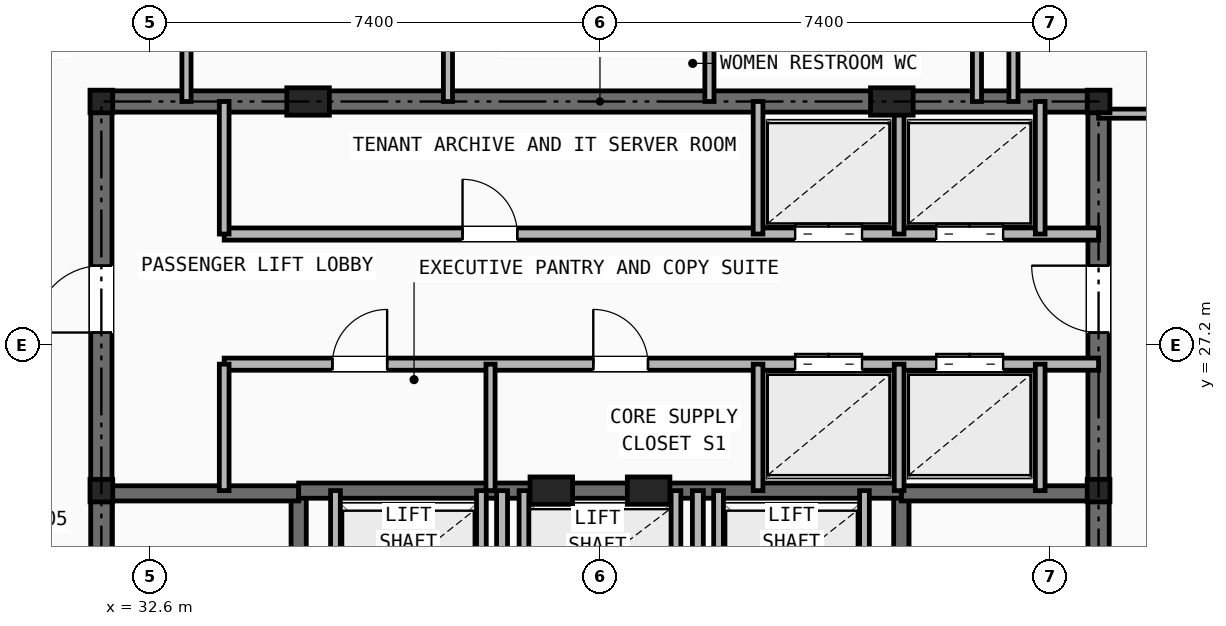
"""IFC4 building model, lengths in metres.
Left out: names, types, materials, properties, quantities, classifications, styles, units other than length and angle.
Written with IfcOpenShell. Run it as: python <this file> out.ifc"""

import sys

from ifc_helpers import new_model, si_unit, direction, frame, frame_2d, origin, origin_2d, place, context, subcontext, project, spatial, rectangle, i_section, extrude, element, fill, save


model = new_model("IFC4")
c1 = context("Model", 3, precision=1e-05, world=origin(), true_north=direction((0.0, 1.0)))
c2 = subcontext(c1, "Body", "Model", "MODEL_VIEW")
j1 = project(units=[si_unit("LENGTHUNIT", "METRE"), si_unit("PLANEANGLEUNIT", "RADIAN")], contexts=[c1])
p1 = place(None, origin())
s1 = spatial("IfcSite", under=j1, at=p1, CompositionType="ELEMENT")
p2 = place(p1, origin())
s2 = spatial("IfcBuilding", under=s1, at=p2, CompositionType="ELEMENT")
p3 = place(p2, frame((0.0, 0.0, 265.5)))
s3 = spatial("IfcBuildingStorey", under=s2, at=p3, CompositionType="ELEMENT", Elevation=265.5)
for number, where, z_axis, x_axis in (
    (1, (31.8, 24.8, 0.0), (0.0, 0.0, 1.0), (1.0, 0.0, 0.0)),
    (2, (48.2, 24.8, 0.0), (0.0, 0.0, 1.0), (1.0, 0.0, 0.0)),
    (3, (31.8, 31.2, 0.0), (0.0, 0.0, 1.0), (1.0, 0.0, 0.0)),
    (4, (48.2, 31.2, 0.0), (0.0, 0.0, 1.0), (1.0, 0.0, 0.0)),
):
    element("IfcColumn", number, at=place(p3, frame(where, z_axis=z_axis, x_axis=x_axis)), inside=s3, PredefinedType="COLUMN", context=c2, shape_type="SweptSolid", body=[
        extrude(i_section(OverallWidth=0.374, OverallDepth=0.372, WebThickness=0.016, FlangeThickness=0.026, at=origin_2d()), origin(), (0.0, 0.0, 1.0), 3.5),
    ])
for number, where, z_axis, x_axis in (
    (5, (35.2, 31.2, 0.0), (0.0, 0.0, 1.0), (1.0, 0.0, 0.0)),
    (6, (44.8, 31.2, 0.0), (0.0, 0.0, 1.0), (1.0, 0.0, 0.0)),
    (7, (39.2, 24.8, 0.0), (0.0, 0.0, 1.0), (1.0, 0.0, 0.0)),
    (8, (40.8, 24.8, 0.0), (0.0, 0.0, 1.0), (1.0, 0.0, 0.0)),
):
    element("IfcColumn", number, at=place(p3, frame(where, z_axis=z_axis, x_axis=x_axis)), inside=s3, PredefinedType="PILASTER", context=c2, shape_type="SweptSolid", body=[
        extrude(rectangle(XDim=0.7, YDim=0.45, at=origin_2d()), origin(), (0.0, 0.0, 1.0), 3.5),
    ])
p4 = place(p3, frame((31.8, 31.2, 0.0), z_axis=(0.0, 0.0, 1.0), x_axis=(1.0, 0.0, 0.0)))
e9 = element("IfcWall", 9, at=p4, inside=s3, PredefinedType="SHEAR", context=c2, shape_type="SweptSolid", body=[
    extrude(rectangle(XDim=16.4, YDim=0.35, at=frame_2d((8.2, 0.0))), origin(), (0.0, 0.0, 1.0), 3.25),
])
p5 = place(p3, frame((31.8, 16.4, 0.0), z_axis=(0.0, 0.0, 1.0), x_axis=(0.0, 1.0, 0.0)))
e10 = element("IfcWall", 10, at=p5, inside=s3, PredefinedType="SHEAR", context=c2, shape_type="SweptSolid", body=[
    extrude(rectangle(XDim=14.8, YDim=0.35, at=frame_2d((7.4, 0.0))), origin(), (0.0, 0.0, 1.0), 3.25),
])
p6 = place(p5, frame((11.0, 0.0, 0.0)))
e11 = element("IfcOpeningElement", 11, at=p6, cuts=e10, PredefinedType="OPENING", context=c2, shape_type="SweptSolid", body=[
    extrude(rectangle(XDim=1.1, YDim=2.15, at=frame_2d((0.55, 1.075))), frame((0.0, 0.185, 0.0), z_axis=(0.0, -1.0, 0.0), x_axis=(1.0, 0.0, 0.0)), (0.0, 0.0, 1.0), 0.37),
])
p7 = place(p3, frame((48.2, 16.4, 0.0), z_axis=(0.0, 0.0, 1.0), x_axis=(0.0, 1.0, 0.0)))
e12 = element("IfcWall", 12, at=p7, inside=s3, PredefinedType="SHEAR", context=c2, shape_type="SweptSolid", body=[
    extrude(rectangle(XDim=14.8, YDim=0.35, at=frame_2d((7.4, 0.0))), origin(), (0.0, 0.0, 1.0), 3.25),
])
p8 = place(p7, frame((11.0, 0.0, 0.0)))
e13 = element("IfcOpeningElement", 13, at=p8, cuts=e12, PredefinedType="OPENING", context=c2, shape_type="SweptSolid", body=[
    extrude(rectangle(XDim=1.1, YDim=2.15, at=frame_2d((0.55, 1.075))), frame((0.0, 0.185, 0.0), z_axis=(0.0, -1.0, 0.0), x_axis=(1.0, 0.0, 0.0)), (0.0, 0.0, 1.0), 0.37),
])
p9 = place(p3, frame((35.045, 16.4, 0.0), z_axis=(0.0, 0.0, 1.0), x_axis=(0.0, 1.0, 0.0)))
e14 = element("IfcWall", 14, at=p9, inside=s3, PredefinedType="SHEAR", context=c2, shape_type="SweptSolid", body=[
    extrude(rectangle(XDim=8.4, YDim=0.25, at=frame_2d((4.2, 0.0))), origin(), (0.0, 0.0, 1.0), 3.25),
])
p10 = place(p9, frame((0.45, 0.0, 0.0)))
e15 = element("IfcOpeningElement", 15, at=p10, cuts=e14, PredefinedType="OPENING", context=c2, shape_type="SweptSolid", body=[
    extrude(rectangle(XDim=0.95, YDim=2.1, at=frame_2d((0.475, 1.05))), frame((0.0, 0.135, 0.0), z_axis=(0.0, -1.0, 0.0), x_axis=(1.0, 0.0, 0.0)), (0.0, 0.0, 1.0), 0.27),
])
p11 = place(p3, frame((31.8, 24.755, 0.0), z_axis=(0.0, 0.0, 1.0), x_axis=(1.0, 0.0, 0.0)))
e16 = element("IfcWall", 16, at=p11, inside=s3, PredefinedType="SHEAR", context=c2, shape_type="SweptSolid", body=[
    extrude(rectangle(XDim=3.245, YDim=0.25, at=frame_2d((1.623, 0.0))), origin(), (0.0, 0.0, 1.0), 3.25),
])
p12 = place(p3, frame((44.955, 16.4, 0.0), z_axis=(0.0, 0.0, 1.0), x_axis=(0.0, 1.0, 0.0)))
e17 = element("IfcWall", 17, at=p12, inside=s3, PredefinedType="SHEAR", context=c2, shape_type="SweptSolid", body=[
    extrude(rectangle(XDim=8.4, YDim=0.25, at=frame_2d((4.2, 0.0))), origin(), (0.0, 0.0, 1.0), 3.25),
])
p13 = place(p12, frame((0.45, 0.0, 0.0)))
e18 = element("IfcOpeningElement", 18, at=p13, cuts=e17, PredefinedType="OPENING", context=c2, shape_type="SweptSolid", body=[
    extrude(rectangle(XDim=0.95, YDim=2.1, at=frame_2d((0.475, 1.05))), frame((0.0, 0.135, 0.0), z_axis=(0.0, -1.0, 0.0), x_axis=(1.0, 0.0, 0.0)), (0.0, 0.0, 1.0), 0.27),
])
p14 = place(p3, frame((44.955, 24.755, 0.0), z_axis=(0.0, 0.0, 1.0), x_axis=(1.0, 0.0, 0.0)))
e19 = element("IfcWall", 19, at=p14, inside=s3, PredefinedType="SHEAR", context=c2, shape_type="SweptSolid", body=[
    extrude(rectangle(XDim=3.245, YDim=0.25, at=frame_2d((1.623, 0.0))), origin(), (0.0, 0.0, 1.0), 3.25),
])
p15 = place(p3, frame((35.045, 24.8, 0.0), z_axis=(0.0, 0.0, 1.0), x_axis=(1.0, 0.0, 0.0)))
e20 = element("IfcWall", 20, at=p15, inside=s3, PredefinedType="SHEAR", context=c2, shape_type="SweptSolid", body=[
    extrude(rectangle(XDim=9.91, YDim=0.25, at=frame_2d((4.955, 0.0))), origin(), (0.0, 0.0, 1.0), 3.25),
])
p16 = place(p3, frame((38.39, 16.4, 0.0), z_axis=(0.0, 0.0, 1.0), x_axis=(0.0, 1.0, 0.0)))
e21 = element("IfcWall", 21, at=p16, inside=s3, PredefinedType="PARTITIONING", context=c2, shape_type="SweptSolid", body=[
    extrude(rectangle(XDim=8.4, YDim=0.18, at=frame_2d((4.2, 0.0))), origin(), (0.0, 0.0, 1.0), 2.978),
])
p17 = place(p16, frame((1.8, 0.0, 0.0)))
e22 = element("IfcOpeningElement", 22, at=p17, cuts=e21, PredefinedType="OPENING", context=c2, shape_type="SweptSolid", body=[
    extrude(rectangle(XDim=0.85, YDim=2.05, at=frame_2d((0.425, 1.025))), frame((0.0, 0.1, 0.0), z_axis=(0.0, -1.0, 0.0), x_axis=(1.0, 0.0, 0.0)), (0.0, 0.0, 1.0), 0.2),
])
p18 = place(p16, frame((4.35, 0.0, 0.0)))
e23 = element("IfcOpeningElement", 23, at=p18, cuts=e21, PredefinedType="OPENING", context=c2, shape_type="SweptSolid", body=[
    extrude(rectangle(XDim=0.95, YDim=2.1, at=frame_2d((0.475, 1.05))), frame((0.0, 0.1, 0.0), z_axis=(0.0, -1.0, 0.0), x_axis=(1.0, 0.0, 0.0)), (0.0, 0.0, 1.0), 0.2),
])
p19 = place(p3, frame((41.61, 16.4, 0.0), z_axis=(0.0, 0.0, 1.0), x_axis=(0.0, 1.0, 0.0)))
e24 = element("IfcWall", 24, at=p19, inside=s3, PredefinedType="PARTITIONING", context=c2, shape_type="SweptSolid", body=[
    extrude(rectangle(XDim=8.4, YDim=0.18, at=frame_2d((4.2, 0.0))), origin(), (0.0, 0.0, 1.0), 2.978),
])
p20 = place(p19, frame((1.8, 0.0, 0.0)))
e25 = element("IfcOpeningElement", 25, at=p20, cuts=e24, PredefinedType="OPENING", context=c2, shape_type="SweptSolid", body=[
    extrude(rectangle(XDim=0.85, YDim=2.05, at=frame_2d((0.425, 1.025))), frame((0.0, 0.1, 0.0), z_axis=(0.0, -1.0, 0.0), x_axis=(1.0, 0.0, 0.0)), (0.0, 0.0, 1.0), 0.2),
])
for number, where, z_axis, x_axis in (
    (26, (35.65, 22.48, 0.0), (0.0, 0.0, 1.0), (0.0, 1.0, 0.0)),
    (27, (38.05, 22.48, 0.0), (0.0, 0.0, 1.0), (0.0, 1.0, 0.0)),
    (28, (41.95, 22.48, 0.0), (0.0, 0.0, 1.0), (0.0, 1.0, 0.0)),
    (29, (44.35, 22.48, 0.0), (0.0, 0.0, 1.0), (0.0, 1.0, 0.0)),
    (30, (38.75, 22.48, 0.0), (0.0, 0.0, 1.0), (0.0, 1.0, 0.0)),
    (31, (41.25, 22.48, 0.0), (0.0, 0.0, 1.0), (0.0, 1.0, 0.0)),
):
    element("IfcWall", number, at=place(p3, frame(where, z_axis=z_axis, x_axis=x_axis)), inside=s3, PredefinedType="SOLIDWALL", context=c2, shape_type="SweptSolid", body=[
        extrude(rectangle(XDim=2.32, YDim=0.16, at=frame_2d((1.16, 0.0))), origin(), (0.0, 0.0, 1.0), 3.25),
    ])
p21 = place(p3, frame((33.82, 29.02, 0.0), z_axis=(0.0, 0.0, 1.0), x_axis=(1.0, 0.0, 0.0)))
e32 = element("IfcWall", 32, at=p21, inside=s3, PredefinedType="SOLIDWALL", context=c2, shape_type="SweptSolid", body=[
    extrude(rectangle(XDim=14.38, YDim=0.2, at=frame_2d((7.19, 0.0))), origin(), (0.0, 0.0, 1.0), 2.705),
])
p22 = place(p21, frame((3.92, 0.0, 0.0)))
e33 = element("IfcOpeningElement", 33, at=p22, cuts=e32, PredefinedType="OPENING", context=c2, shape_type="SweptSolid", body=[
    extrude(rectangle(XDim=0.9, YDim=2.1, at=frame_2d((0.45, 1.05))), frame((0.0, 0.11, 0.0), z_axis=(0.0, -1.0, 0.0), x_axis=(1.0, 0.0, 0.0)), (0.0, 0.0, 1.0), 0.22),
])
p23 = place(p21, frame((9.39, 0.0, 0.0)))
e34 = element("IfcOpeningElement", 34, at=p23, cuts=e32, PredefinedType="OPENING", context=c2, shape_type="SweptSolid", body=[
    extrude(rectangle(XDim=1.1, YDim=2.15, at=frame_2d((0.55, 1.075))), frame((0.0, 0.11, 0.0), z_axis=(0.0, -1.0, 0.0), x_axis=(1.0, 0.0, 0.0)), (0.0, 0.0, 1.0), 0.22),
])
p24 = place(p21, frame((11.71, 0.0, 0.0)))
e35 = element("IfcOpeningElement", 35, at=p24, cuts=e32, PredefinedType="OPENING", context=c2, shape_type="SweptSolid", body=[
    extrude(rectangle(XDim=1.1, YDim=2.15, at=frame_2d((0.55, 1.075))), frame((0.0, 0.11, 0.0), z_axis=(0.0, -1.0, 0.0), x_axis=(1.0, 0.0, 0.0)), (0.0, 0.0, 1.0), 0.22),
])
p25 = place(p3, frame((33.82, 26.88, 0.0), z_axis=(0.0, 0.0, 1.0), x_axis=(1.0, 0.0, 0.0)))
e36 = element("IfcWall", 36, at=p25, inside=s3, PredefinedType="SOLIDWALL", context=c2, shape_type="SweptSolid", body=[
    extrude(rectangle(XDim=14.38, YDim=0.2, at=frame_2d((7.19, 0.0))), origin(), (0.0, 0.0, 1.0), 2.705),
])
p26 = place(p25, frame((1.78, 0.0, 0.0)))
e37 = element("IfcOpeningElement", 37, at=p26, cuts=e36, PredefinedType="OPENING", context=c2, shape_type="SweptSolid", body=[
    extrude(rectangle(XDim=0.9, YDim=2.1, at=frame_2d((0.45, 1.05))), frame((0.0, 0.11, 0.0), z_axis=(0.0, -1.0, 0.0), x_axis=(1.0, 0.0, 0.0)), (0.0, 0.0, 1.0), 0.22),
])
p27 = place(p25, frame((6.07, 0.0, 0.0)))
e38 = element("IfcOpeningElement", 38, at=p27, cuts=e36, PredefinedType="OPENING", context=c2, shape_type="SweptSolid", body=[
    extrude(rectangle(XDim=0.9, YDim=2.1, at=frame_2d((0.45, 1.05))), frame((0.0, 0.11, 0.0), z_axis=(0.0, -1.0, 0.0), x_axis=(1.0, 0.0, 0.0)), (0.0, 0.0, 1.0), 0.22),
])
p28 = place(p25, frame((9.39, 0.0, 0.0)))
e39 = element("IfcOpeningElement", 39, at=p28, cuts=e36, PredefinedType="OPENING", context=c2, shape_type="SweptSolid", body=[
    extrude(rectangle(XDim=1.1, YDim=2.15, at=frame_2d((0.55, 1.075))), frame((0.0, 0.11, 0.0), z_axis=(0.0, -1.0, 0.0), x_axis=(1.0, 0.0, 0.0)), (0.0, 0.0, 1.0), 0.22),
])
p29 = place(p25, frame((11.71, 0.0, 0.0)))
e40 = element("IfcOpeningElement", 40, at=p29, cuts=e36, PredefinedType="OPENING", context=c2, shape_type="SweptSolid", body=[
    extrude(rectangle(XDim=1.1, YDim=2.15, at=frame_2d((0.55, 1.075))), frame((0.0, 0.11, 0.0), z_axis=(0.0, -1.0, 0.0), x_axis=(1.0, 0.0, 0.0)), (0.0, 0.0, 1.0), 0.22),
])
p30 = place(p3, frame((33.82, 29.02, 0.0), z_axis=(0.0, 0.0, 1.0), x_axis=(0.0, 1.0, 0.0)))
e41 = element("IfcWall", 41, at=p30, inside=s3, PredefinedType="SOLIDWALL", context=c2, shape_type="SweptSolid", body=[
    extrude(rectangle(XDim=2.18, YDim=0.16, at=frame_2d((1.09, 0.0))), origin(), (0.0, 0.0, 1.0), 2.978),
])
p31 = place(p3, frame((33.82, 24.8, 0.0), z_axis=(0.0, 0.0, 1.0), x_axis=(0.0, 1.0, 0.0)))
e42 = element("IfcWall", 42, at=p31, inside=s3, PredefinedType="SOLIDWALL", context=c2, shape_type="SweptSolid", body=[
    extrude(rectangle(XDim=2.08, YDim=0.16, at=frame_2d((1.04, 0.0))), origin(), (0.0, 0.0, 1.0), 3.25),
])
p32 = place(p3, frame((38.2, 24.8, 0.0), z_axis=(0.0, 0.0, 1.0), x_axis=(0.0, 1.0, 0.0)))
e43 = element("IfcWall", 43, at=p32, inside=s3, PredefinedType="PARTITIONING", context=c2, shape_type="SweptSolid", body=[
    extrude(rectangle(XDim=2.08, YDim=0.15, at=frame_2d((1.04, 0.0))), origin(), (0.0, 0.0, 1.0), 3.25),
])
for number, where, z_axis, x_axis in (
    (44, (42.6, 29.02, 0.0), (0.0, 0.0, 1.0), (0.0, 1.0, 0.0)),
    (45, (44.92, 29.02, 0.0), (0.0, 0.0, 1.0), (0.0, 1.0, 0.0)),
    (46, (47.24, 29.02, 0.0), (0.0, 0.0, 1.0), (0.0, 1.0, 0.0)),
):
    element("IfcWall", number, at=place(p3, frame(where, z_axis=z_axis, x_axis=x_axis)), inside=s3, PredefinedType="SOLIDWALL", context=c2, shape_type="SweptSolid", body=[
        extrude(rectangle(XDim=2.18, YDim=0.16, at=frame_2d((1.09, 0.0))), origin(), (0.0, 0.0, 1.0), 2.978),
    ])
for number, where, z_axis, x_axis in (
    (47, (42.6, 24.8, 0.0), (0.0, 0.0, 1.0), (0.0, 1.0, 0.0)),
    (48, (44.92, 24.8, 0.0), (0.0, 0.0, 1.0), (0.0, 1.0, 0.0)),
    (49, (47.24, 24.8, 0.0), (0.0, 0.0, 1.0), (0.0, 1.0, 0.0)),
):
    element("IfcWall", number, at=place(p3, frame(where, z_axis=z_axis, x_axis=x_axis)), inside=s3, PredefinedType="SOLIDWALL", context=c2, shape_type="SweptSolid", body=[
        extrude(rectangle(XDim=2.08, YDim=0.16, at=frame_2d((1.04, 0.0))), origin(), (0.0, 0.0, 1.0), 3.25),
    ])
for number, where, z_axis, x_axis in (
    (50, (33.2, 31.2, 0.0), (0.0, 0.0, 1.0), (0.0, 1.0, 0.0)),
    (51, (46.2, 31.2, 0.0), (0.0, 0.0, 1.0), (0.0, 1.0, 0.0)),
    (52, (37.5, 31.2, 0.0), (0.0, 0.0, 1.0), (0.0, 1.0, 0.0)),
    (53, (41.8, 31.2, 0.0), (0.0, 0.0, 1.0), (0.0, 1.0, 0.0)),
):
    element("IfcWall", number, at=place(p3, frame(where, z_axis=z_axis, x_axis=x_axis)), inside=s3, PredefinedType="PARTITIONING", context=c2, shape_type="SweptSolid", body=[
        extrude(rectangle(XDim=2.6, YDim=0.15, at=frame_2d((1.3, 0.0))), origin(), (0.0, 0.0, 1.0), 2.978),
    ])
p33 = place(p3, frame((46.8, 31.2, 0.0), z_axis=(0.0, 0.0, 1.0), x_axis=(0.0, 1.0, 0.0)))
e54 = element("IfcWall", 54, at=p33, inside=s3, PredefinedType="PARTITIONING", context=c2, shape_type="SweptSolid", body=[
    extrude(rectangle(XDim=4.5, YDim=0.15, at=frame_2d((2.25, 0.0))), origin(), (0.0, 0.0, 1.0), 2.978),
])
p34 = place(p3, frame((48.2, 31.0, 0.0), z_axis=(0.0, 0.0, 1.0), x_axis=(1.0, 0.0, 0.0)))
e55 = element("IfcWall", 55, at=p34, inside=s3, PredefinedType="PARTITIONING", context=c2, shape_type="SweptSolid", body=[
    extrude(rectangle(XDim=4.468, YDim=0.15, at=frame_2d((2.234, 0.0))), origin(), (0.0, 0.0, 1.0), 2.292),
])
p35 = place(p34, frame((1.4, 0.0, 0.0)))
e56 = element("IfcOpeningElement", 56, at=p35, cuts=e55, PredefinedType="OPENING", context=c2, shape_type="SweptSolid", body=[
    extrude(rectangle(XDim=0.95, YDim=2.1, at=frame_2d((0.475, 1.05))), frame((0.0, 0.085, 0.0), z_axis=(0.0, -1.0, 0.0), x_axis=(1.0, 0.0, 0.0)), (0.0, 0.0, 1.0), 0.17),
])
p36 = place(p6, origin())
e57 = element("IfcDoor", 57, at=p36, inside=s3, OperationType="SINGLE_SWING_LEFT", PredefinedType="DOOR", context=c2, shape_type="SweptSolid", body=[
    extrude(rectangle(XDim=1.1, YDim=2.15, at=frame_2d((0.55, 1.075))), frame((0.0, 0.025, 0.0), z_axis=(0.0, -1.0, 0.0), x_axis=(1.0, 0.0, 0.0)), (0.0, 0.0, 1.0), 0.05),
])
fill(e11, e57)
p37 = place(p8, origin())
e58 = element("IfcDoor", 58, at=p37, inside=s3, OperationType="SINGLE_SWING_RIGHT", PredefinedType="DOOR", context=c2, shape_type="SweptSolid", body=[
    extrude(rectangle(XDim=1.1, YDim=2.15, at=frame_2d((0.55, 1.075))), frame((0.0, 0.025, 0.0), z_axis=(0.0, -1.0, 0.0), x_axis=(1.0, 0.0, 0.0)), (0.0, 0.0, 1.0), 0.05),
])
fill(e13, e58)
p38 = place(p22, origin())
e59 = element("IfcDoor", 59, at=p38, inside=s3, OperationType="SINGLE_SWING_LEFT", PredefinedType="DOOR", context=c2, shape_type="SweptSolid", body=[
    extrude(rectangle(XDim=0.9, YDim=2.1, at=frame_2d((0.45, 1.05))), frame((0.0, 0.025, 0.0), z_axis=(0.0, -1.0, 0.0), x_axis=(1.0, 0.0, 0.0)), (0.0, 0.0, 1.0), 0.05),
])
fill(e33, e59)
p39 = place(p26, origin())
e60 = element("IfcDoor", 60, at=p39, inside=s3, OperationType="SINGLE_SWING_RIGHT", PredefinedType="DOOR", context=c2, shape_type="SweptSolid", body=[
    extrude(rectangle(XDim=0.9, YDim=2.1, at=frame_2d((0.45, 1.05))), frame((0.0, 0.025, 0.0), z_axis=(0.0, -1.0, 0.0), x_axis=(1.0, 0.0, 0.0)), (0.0, 0.0, 1.0), 0.05),
])
fill(e37, e60)
p40 = place(p27, origin())
e61 = element("IfcDoor", 61, at=p40, inside=s3, OperationType="SINGLE_SWING_LEFT", PredefinedType="DOOR", context=c2, shape_type="SweptSolid", body=[
    extrude(rectangle(XDim=0.9, YDim=2.1, at=frame_2d((0.45, 1.05))), frame((0.0, 0.025, 0.0), z_axis=(0.0, -1.0, 0.0), x_axis=(1.0, 0.0, 0.0)), (0.0, 0.0, 1.0), 0.05),
])
fill(e38, e61)
p41 = place(p23, origin())
e62 = element("IfcDoor", 62, at=p41, inside=s3, OperationType="DOUBLE_DOOR_SLIDING", PredefinedType="DOOR", context=c2, shape_type="SweptSolid", body=[
    extrude(rectangle(XDim=1.1, YDim=2.15, at=frame_2d((0.55, 1.075))), frame((0.0, 0.025, 0.0), z_axis=(0.0, -1.0, 0.0), x_axis=(1.0, 0.0, 0.0)), (0.0, 0.0, 1.0), 0.05),
])
fill(e34, e62)
p42 = place(p24, origin())
e63 = element("IfcDoor", 63, at=p42, inside=s3, OperationType="DOUBLE_DOOR_SLIDING", PredefinedType="DOOR", context=c2, shape_type="SweptSolid", body=[
    extrude(rectangle(XDim=1.1, YDim=2.15, at=frame_2d((0.55, 1.075))), frame((0.0, 0.025, 0.0), z_axis=(0.0, -1.0, 0.0), x_axis=(1.0, 0.0, 0.0)), (0.0, 0.0, 1.0), 0.05),
])
fill(e35, e63)
p43 = place(p28, origin())
e64 = element("IfcDoor", 64, at=p43, inside=s3, OperationType="DOUBLE_DOOR_SLIDING", PredefinedType="DOOR", context=c2, shape_type="SweptSolid", body=[
    extrude(rectangle(XDim=1.1, YDim=2.15, at=frame_2d((0.55, 1.075))), frame((0.0, 0.025, 0.0), z_axis=(0.0, -1.0, 0.0), x_axis=(1.0, 0.0, 0.0)), (0.0, 0.0, 1.0), 0.05),
])
fill(e39, e64)
p44 = place(p29, origin())
e65 = element("IfcDoor", 65, at=p44, inside=s3, OperationType="DOUBLE_DOOR_SLIDING", PredefinedType="DOOR", context=c2, shape_type="SweptSolid", body=[
    extrude(rectangle(XDim=1.1, YDim=2.15, at=frame_2d((0.55, 1.075))), frame((0.0, 0.025, 0.0), z_axis=(0.0, -1.0, 0.0), x_axis=(1.0, 0.0, 0.0)), (0.0, 0.0, 1.0), 0.05),
])
fill(e40, e65)
save(model, sys.argv[1])
